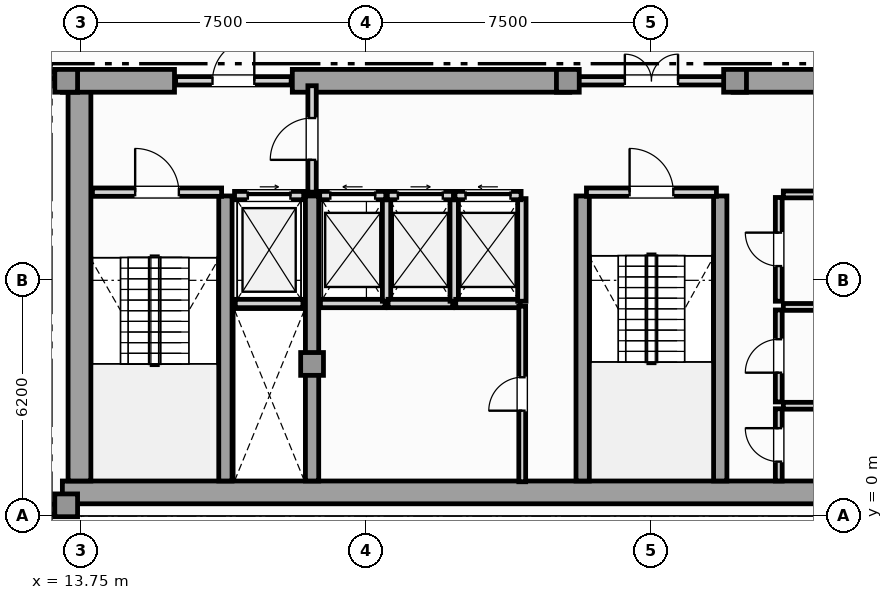
"""IFC4 building model, lengths in metres.
Left out: names, types, materials, properties, quantities, classifications, styles, units other than length and angle.
Written with IfcOpenShell. Run it as: python <this file> out.ifc"""

import sys

from ifc_helpers import new_model, si_unit, direction, frame, frame_2d, origin, origin_2d, place, context, subcontext, project, spatial, rectangle, extrude, element, fill, save


model = new_model("IFC4")
c1 = context("Model", 3, precision=1e-05, world=origin(), true_north=direction((0.0, 1.0)))
c2 = subcontext(c1, "Body", "Model", "MODEL_VIEW")
j1 = project(units=[si_unit("LENGTHUNIT", "METRE"), si_unit("PLANEANGLEUNIT", "RADIAN")], contexts=[c1])
p1 = place(None, origin())
s1 = spatial("IfcSite", under=j1, at=p1, CompositionType="ELEMENT")
p2 = place(p1, origin())
s2 = spatial("IfcBuilding", under=s1, at=p2, CompositionType="ELEMENT")
p3 = place(p2, frame((0.0, 0.0, 281.05)))
s3 = spatial("IfcBuildingStorey", under=s2, at=p3, CompositionType="ELEMENT", Elevation=281.05)
p4 = place(p3, frame((13.25, 0.62, 0.0), z_axis=(0.0, 0.0, 1.0), x_axis=(1.0, 0.0, 0.0)))
e1 = element("IfcWall", 1, at=p4, inside=s3, PredefinedType="SHEAR", context=c2, shape_type="SweptSolid", body=[
    extrude(rectangle(XDim=31.0, YDim=0.6, at=frame_2d((15.5, 0.0))), origin(), (0.0, 0.0, 1.0), 3.65),
])
p5 = place(p3, frame((13.7, 0.92, 0.0), z_axis=(0.0, 0.0, 1.0), x_axis=(0.0, 1.0, 0.0)))
e2 = element("IfcWall", 2, at=p5, inside=s3, PredefinedType="SHEAR", context=c2, shape_type="SweptSolid", body=[
    extrude(rectangle(XDim=10.53, YDim=0.6, at=frame_2d((5.265, 0.0))), origin(), (0.0, 0.0, 1.0), 3.65),
])
p6 = place(p3, frame((13.25, 11.45, 0.0), z_axis=(0.0, 0.0, 1.0), x_axis=(1.0, 0.0, 0.0)))
e3 = element("IfcWall", 3, at=p6, inside=s3, PredefinedType="SHEAR", context=c2, shape_type="SweptSolid", body=[
    extrude(rectangle(XDim=2.95, YDim=0.6, at=frame_2d((1.475, 0.0))), origin(), (0.0, 0.0, 1.0), 3.65),
])
for number, where, z_axis, x_axis in (
    (4, (19.3, 11.45, 0.0), (0.0, 0.0, 1.0), (1.0, 0.0, 0.0)),
    (5, (30.9, 11.45, 0.0), (0.0, 0.0, 1.0), (1.0, 0.0, 0.0)),
):
    element("IfcWall", number, at=place(p3, frame(where, z_axis=z_axis, x_axis=x_axis)), inside=s3, PredefinedType="SHEAR", context=c2, shape_type="SweptSolid", body=[
        extrude(rectangle(XDim=7.3, YDim=0.6, at=frame_2d((3.65, 0.0))), origin(), (0.0, 0.0, 1.0), 3.65),
    ])
for number, where, z_axis, x_axis in (
    (6, (17.54, 0.92, 0.0), (0.0, 0.0, 1.0), (0.0, 1.0, 0.0)),
    (7, (19.82, 0.92, 0.0), (0.0, 0.0, 1.0), (0.0, 1.0, 0.0)),
    (8, (26.94, 0.92, 0.0), (0.0, 0.0, 1.0), (0.0, 1.0, 0.0)),
    (9, (30.56, 0.92, 0.0), (0.0, 0.0, 1.0), (0.0, 1.0, 0.0)),
):
    element("IfcWall", number, at=place(p3, frame(where, z_axis=z_axis, x_axis=x_axis)), inside=s3, PredefinedType="SHEAR", context=c2, shape_type="SweptSolid", body=[
        extrude(rectangle(XDim=7.5, YDim=0.35, at=frame_2d((3.75, 0.0))), origin(), (0.0, 0.0, 1.0), 3.65),
    ])
for number, where, z_axis, x_axis in (
    (10, (13.35, 0.28, 0.0), (0.0, 0.0, 1.0), (1.0, 0.0, 0.0)),
    (11, (13.35, 11.45, 0.0), (0.0, 0.0, 1.0), (1.0, 0.0, 0.0)),
    (12, (19.82, 4.0, 0.0), (0.0, 0.0, 1.0), (1.0, 0.0, 0.0)),
    (13, (26.55, 11.45, 0.0), (0.0, 0.0, 1.0), (1.0, 0.0, 0.0)),
    (14, (30.95, 11.45, 0.0), (0.0, 0.0, 1.0), (1.0, 0.0, 0.0)),
):
    element("IfcColumn", number, at=place(p3, frame(where, z_axis=z_axis, x_axis=x_axis)), inside=s3, PredefinedType="COLUMN", context=c2, shape_type="SweptSolid", body=[
        extrude(rectangle(XDim=0.6, YDim=0.6, at=origin_2d()), origin(), (0.0, 0.0, 1.0), 3.85),
    ])
p7 = place(p3, frame((11.593, 0.18, 0.0), z_axis=(0.0, 0.0, 1.0), x_axis=(1.0, 0.0, 0.0)))
e15 = element("IfcWall", 15, at=p7, inside=s3, PredefinedType="SOLIDWALL", context=c2, shape_type="SweptSolid", body=[
    extrude(rectangle(XDim=1.657, YDim=0.26, at=frame_2d((0.829, 0.0))), origin(), (0.0, 0.0, 1.0), 3.65),
])
p8 = place(p3, frame((17.8, 5.59, 0.0), z_axis=(0.0, 0.0, 1.0), x_axis=(1.0, 0.0, 0.0)))
e16 = element("IfcWall", 16, at=p8, inside=s3, PredefinedType="SOLIDWALL", context=c2, shape_type="SweptSolid", body=[
    extrude(rectangle(XDim=1.78, YDim=0.22, at=frame_2d((0.89, 0.0))), origin(), (0.0, 0.0, 1.0), 3.65),
])
p9 = place(p3, frame((17.78, 8.43, 0.0), z_axis=(0.0, 0.0, 1.0), x_axis=(1.0, 0.0, 0.0)))
e17 = element("IfcWall", 17, at=p9, inside=s3, PredefinedType="SOLIDWALL", context=c2, shape_type="SweptSolid", body=[
    extrude(rectangle(XDim=1.82, YDim=0.22, at=frame_2d((0.91, 0.0))), origin(), (0.0, 0.0, 1.0), 3.65),
])
p10 = place(p9, frame((0.35, 0.0, 0.0)))
e18 = element("IfcOpeningElement", 18, at=p10, cuts=e17, PredefinedType="OPENING", context=c2, shape_type="SweptSolid", body=[
    extrude(rectangle(XDim=1.12, YDim=2.25, at=frame_2d((0.56, 1.125))), frame((0.0, 0.12, 0.0), z_axis=(0.0, -1.0, 0.0), x_axis=(1.0, 0.0, 0.0)), (0.0, 0.0, 1.0), 0.24),
])
p11 = place(p3, frame((20.04, 5.59, 0.0), z_axis=(0.0, 0.0, 1.0), x_axis=(1.0, 0.0, 0.0)))
e19 = element("IfcWall", 19, at=p11, inside=s3, PredefinedType="SOLIDWALL", context=c2, shape_type="SweptSolid", body=[
    extrude(rectangle(XDim=1.7, YDim=0.22, at=frame_2d((0.85, 0.0))), origin(), (0.0, 0.0, 1.0), 3.65),
])
p12 = place(p3, frame((21.78, 5.65, 0.0), z_axis=(0.0, 0.0, 1.0), x_axis=(0.0, 1.0, 0.0)))
e20 = element("IfcWall", 20, at=p12, inside=s3, PredefinedType="SOLIDWALL", context=c2, shape_type="SweptSolid", body=[
    extrude(rectangle(XDim=2.7, YDim=0.22, at=frame_2d((1.35, 0.0))), origin(), (0.0, 0.0, 1.0), 3.65),
])
p13 = place(p3, frame((20.02, 8.43, 0.0), z_axis=(0.0, 0.0, 1.0), x_axis=(1.0, 0.0, 0.0)))
e21 = element("IfcWall", 21, at=p13, inside=s3, PredefinedType="SOLIDWALL", context=c2, shape_type="SweptSolid", body=[
    extrude(rectangle(XDim=1.74, YDim=0.22, at=frame_2d((0.87, 0.0))), origin(), (0.0, 0.0, 1.0), 3.65),
])
p14 = place(p13, frame((0.28, 0.0, 0.0)))
e22 = element("IfcOpeningElement", 22, at=p14, cuts=e21, PredefinedType="OPENING", context=c2, shape_type="SweptSolid", body=[
    extrude(rectangle(XDim=1.18, YDim=2.2, at=frame_2d((0.59, 1.1))), frame((0.0, 0.12, 0.0), z_axis=(0.0, -1.0, 0.0), x_axis=(1.0, 0.0, 0.0)), (0.0, 0.0, 1.0), 0.24),
])
p15 = place(p3, frame((21.82, 5.59, 0.0), z_axis=(0.0, 0.0, 1.0), x_axis=(1.0, 0.0, 0.0)))
e23 = element("IfcWall", 23, at=p15, inside=s3, PredefinedType="SOLIDWALL", context=c2, shape_type="SweptSolid", body=[
    extrude(rectangle(XDim=1.7, YDim=0.22, at=frame_2d((0.85, 0.0))), origin(), (0.0, 0.0, 1.0), 3.65),
])
p16 = place(p3, frame((23.56, 5.65, 0.0), z_axis=(0.0, 0.0, 1.0), x_axis=(0.0, 1.0, 0.0)))
e24 = element("IfcWall", 24, at=p16, inside=s3, PredefinedType="SOLIDWALL", context=c2, shape_type="SweptSolid", body=[
    extrude(rectangle(XDim=2.7, YDim=0.22, at=frame_2d((1.35, 0.0))), origin(), (0.0, 0.0, 1.0), 3.65),
])
p17 = place(p3, frame((21.8, 8.43, 0.0), z_axis=(0.0, 0.0, 1.0), x_axis=(1.0, 0.0, 0.0)))
e25 = element("IfcWall", 25, at=p17, inside=s3, PredefinedType="SOLIDWALL", context=c2, shape_type="SweptSolid", body=[
    extrude(rectangle(XDim=1.74, YDim=0.22, at=frame_2d((0.87, 0.0))), origin(), (0.0, 0.0, 1.0), 3.65),
])
p18 = place(p17, frame((0.28, 0.0, 0.0)))
e26 = element("IfcOpeningElement", 26, at=p18, cuts=e25, PredefinedType="OPENING", context=c2, shape_type="SweptSolid", body=[
    extrude(rectangle(XDim=1.18, YDim=2.2, at=frame_2d((0.59, 1.1))), frame((0.0, 0.12, 0.0), z_axis=(0.0, -1.0, 0.0), x_axis=(1.0, 0.0, 0.0)), (0.0, 0.0, 1.0), 0.24),
])
p19 = place(p3, frame((23.6, 5.59, 0.0), z_axis=(0.0, 0.0, 1.0), x_axis=(1.0, 0.0, 0.0)))
e27 = element("IfcWall", 27, at=p19, inside=s3, PredefinedType="SOLIDWALL", context=c2, shape_type="SweptSolid", body=[
    extrude(rectangle(XDim=1.7, YDim=0.22, at=frame_2d((0.85, 0.0))), origin(), (0.0, 0.0, 1.0), 3.65),
])
p20 = place(p3, frame((25.34, 5.65, 0.0), z_axis=(0.0, 0.0, 1.0), x_axis=(0.0, 1.0, 0.0)))
e28 = element("IfcWall", 28, at=p20, inside=s3, PredefinedType="SOLIDWALL", context=c2, shape_type="SweptSolid", body=[
    extrude(rectangle(XDim=2.7, YDim=0.22, at=frame_2d((1.35, 0.0))), origin(), (0.0, 0.0, 1.0), 3.65),
])
p21 = place(p3, frame((23.58, 8.43, 0.0), z_axis=(0.0, 0.0, 1.0), x_axis=(1.0, 0.0, 0.0)))
e29 = element("IfcWall", 29, at=p21, inside=s3, PredefinedType="SOLIDWALL", context=c2, shape_type="SweptSolid", body=[
    extrude(rectangle(XDim=1.74, YDim=0.22, at=frame_2d((0.87, 0.0))), origin(), (0.0, 0.0, 1.0), 3.65),
])
p22 = place(p21, frame((0.28, 0.0, 0.0)))
e30 = element("IfcOpeningElement", 30, at=p22, cuts=e29, PredefinedType="OPENING", context=c2, shape_type="SweptSolid", body=[
    extrude(rectangle(XDim=1.18, YDim=2.2, at=frame_2d((0.59, 1.1))), frame((0.0, 0.12, 0.0), z_axis=(0.0, -1.0, 0.0), x_axis=(1.0, 0.0, 0.0)), (0.0, 0.0, 1.0), 0.24),
])
p23 = place(p3, frame((14.04, 8.52, 0.0), z_axis=(0.0, 0.0, 1.0), x_axis=(1.0, 0.0, 0.0)))
e31 = element("IfcWall", 31, at=p23, inside=s3, PredefinedType="SOLIDWALL", context=c2, shape_type="SweptSolid", body=[
    extrude(rectangle(XDim=3.4, YDim=0.22, at=frame_2d((1.7, 0.0))), origin(), (0.0, 0.0, 1.0), 3.65),
])
p24 = place(p23, frame((1.125, 0.0, 0.0)))
e32 = element("IfcOpeningElement", 32, at=p24, cuts=e31, PredefinedType="OPENING", context=c2, shape_type="SweptSolid", body=[
    extrude(rectangle(XDim=1.15, YDim=2.2, at=frame_2d((0.575, 1.1))), frame((0.0, 0.12, 0.0), z_axis=(0.0, -1.0, 0.0), x_axis=(1.0, 0.0, 0.0)), (0.0, 0.0, 1.0), 0.24),
])
p25 = place(p3, frame((27.04, 8.52, 0.0), z_axis=(0.0, 0.0, 1.0), x_axis=(1.0, 0.0, 0.0)))
e33 = element("IfcWall", 33, at=p25, inside=s3, PredefinedType="SOLIDWALL", context=c2, shape_type="SweptSolid", body=[
    extrude(rectangle(XDim=3.42, YDim=0.22, at=frame_2d((1.71, 0.0))), origin(), (0.0, 0.0, 1.0), 3.65),
])
p26 = place(p25, frame((1.135, 0.0, 0.0)))
e34 = element("IfcOpeningElement", 34, at=p26, cuts=e33, PredefinedType="OPENING", context=c2, shape_type="SweptSolid", body=[
    extrude(rectangle(XDim=1.15, YDim=2.2, at=frame_2d((0.575, 1.1))), frame((0.0, 0.12, 0.0), z_axis=(0.0, -1.0, 0.0), x_axis=(1.0, 0.0, 0.0)), (0.0, 0.0, 1.0), 0.24),
])
p27 = place(p3, frame((19.82, 8.52, 0.0), z_axis=(0.0, 0.0, 1.0), x_axis=(0.0, 1.0, 0.0)))
e35 = element("IfcWall", 35, at=p27, inside=s3, PredefinedType="SOLIDWALL", context=c2, shape_type="SweptSolid", body=[
    extrude(rectangle(XDim=2.8, YDim=0.22, at=frame_2d((1.4, 0.0))), origin(), (0.0, 0.0, 1.0), 3.105),
])
p28 = place(p27, frame((0.85, 0.0, 0.0)))
e36 = element("IfcOpeningElement", 36, at=p28, cuts=e35, PredefinedType="OPENING", context=c2, shape_type="SweptSolid", body=[
    extrude(rectangle(XDim=1.1, YDim=2.2, at=frame_2d((0.55, 1.1))), frame((0.0, 0.12, 0.0), z_axis=(0.0, -1.0, 0.0), x_axis=(1.0, 0.0, 0.0)), (0.0, 0.0, 1.0), 0.24),
])
p29 = place(p3, frame((16.23, 11.45, 0.0), z_axis=(0.0, 0.0, 1.0), x_axis=(1.0, 0.0, 0.0)))
e37 = element("IfcWall", 37, at=p29, inside=s3, PredefinedType="SOLIDWALL", context=c2, shape_type="SweptSolid", body=[
    extrude(rectangle(XDim=3.04, YDim=0.22, at=frame_2d((1.52, 0.0))), origin(), (0.0, 0.0, 1.0), 3.65),
])
p30 = place(p29, frame((0.97, 0.0, 0.0)))
e38 = element("IfcOpeningElement", 38, at=p30, cuts=e37, PredefinedType="OPENING", context=c2, shape_type="SweptSolid", body=[
    extrude(rectangle(XDim=1.1, YDim=2.2, at=frame_2d((0.55, 1.1))), frame((0.0, 0.12, 0.0), z_axis=(0.0, -1.0, 0.0), x_axis=(1.0, 0.0, 0.0)), (0.0, 0.0, 1.0), 0.24),
])
p31 = place(p3, frame((26.63, 11.45, 0.0), z_axis=(0.0, 0.0, 1.0), x_axis=(1.0, 0.0, 0.0)))
e39 = element("IfcWall", 39, at=p31, inside=s3, PredefinedType="SOLIDWALL", context=c2, shape_type="SweptSolid", body=[
    extrude(rectangle(XDim=4.24, YDim=0.22, at=frame_2d((2.12, 0.0))), origin(), (0.0, 0.0, 1.0), 3.65),
])
p32 = place(p31, frame((1.42, 0.0, 0.0)))
e40 = element("IfcOpeningElement", 40, at=p32, cuts=e39, PredefinedType="OPENING", context=c2, shape_type="SweptSolid", body=[
    extrude(rectangle(XDim=1.4, YDim=2.2, at=frame_2d((0.7, 1.1))), frame((0.0, 0.12, 0.0), z_axis=(0.0, -1.0, 0.0), x_axis=(1.0, 0.0, 0.0)), (0.0, 0.0, 1.0), 0.24),
])
p33 = place(p3, frame((25.35, 0.9, 0.0), z_axis=(0.0, 0.0, 1.0), x_axis=(0.0, 1.0, 0.0)))
e41 = element("IfcWall", 41, at=p33, inside=s3, PredefinedType="PARTITIONING", context=c2, shape_type="SweptSolid", body=[
    extrude(rectangle(XDim=4.62, YDim=0.18, at=frame_2d((2.31, 0.0))), origin(), (0.0, 0.0, 1.0), 3.65),
])
p34 = place(p33, frame((1.87, 0.0, 0.0)))
e42 = element("IfcOpeningElement", 42, at=p34, cuts=e41, PredefinedType="OPENING", context=c2, shape_type="SweptSolid", body=[
    extrude(rectangle(XDim=0.88, YDim=2.05, at=frame_2d((0.44, 1.025))), frame((0.0, 0.1, 0.0), z_axis=(0.0, -1.0, 0.0), x_axis=(1.0, 0.0, 0.0)), (0.0, 0.0, 1.0), 0.2),
])
p35 = place(p3, frame((32.1, 0.92, 0.0), z_axis=(0.0, 0.0, 1.0), x_axis=(0.0, 1.0, 0.0)))
e43 = element("IfcWall", 43, at=p35, inside=s3, PredefinedType="PARTITIONING", context=c2, shape_type="SweptSolid", body=[
    extrude(rectangle(XDim=1.9, YDim=0.18, at=frame_2d((0.95, 0.0))), origin(), (0.0, 0.0, 1.0), 3.65),
])
p36 = place(p35, frame((0.51, 0.0, 0.0)))
e44 = element("IfcOpeningElement", 44, at=p36, cuts=e43, PredefinedType="OPENING", context=c2, shape_type="SweptSolid", body=[
    extrude(rectangle(XDim=0.88, YDim=2.05, at=frame_2d((0.44, 1.025))), frame((0.0, 0.1, 0.0), z_axis=(0.0, -1.0, 0.0), x_axis=(1.0, 0.0, 0.0)), (0.0, 0.0, 1.0), 0.2),
])
p37 = place(p3, frame((32.22, 2.9, 0.0), z_axis=(0.0, 0.0, 1.0), x_axis=(1.0, 0.0, 0.0)))
e45 = element("IfcWall", 45, at=p37, inside=s3, PredefinedType="PARTITIONING", context=c2, shape_type="SweptSolid", body=[
    extrude(rectangle(XDim=2.86, YDim=0.18, at=frame_2d((1.43, 0.0))), origin(), (0.0, 0.0, 1.0), 3.65),
])
p38 = place(p3, frame((32.1, 3.0, 0.0), z_axis=(0.0, 0.0, 1.0), x_axis=(0.0, 1.0, 0.0)))
e46 = element("IfcWall", 46, at=p38, inside=s3, PredefinedType="PARTITIONING", context=c2, shape_type="SweptSolid", body=[
    extrude(rectangle(XDim=2.42, YDim=0.18, at=frame_2d((1.21, 0.0))), origin(), (0.0, 0.0, 1.0), 3.65),
])
p39 = place(p38, frame((0.77, 0.0, 0.0)))
e47 = element("IfcOpeningElement", 47, at=p39, cuts=e46, PredefinedType="OPENING", context=c2, shape_type="SweptSolid", body=[
    extrude(rectangle(XDim=0.88, YDim=2.05, at=frame_2d((0.44, 1.025))), frame((0.0, 0.1, 0.0), z_axis=(0.0, -1.0, 0.0), x_axis=(1.0, 0.0, 0.0)), (0.0, 0.0, 1.0), 0.2),
])
p40 = place(p3, frame((32.22, 5.5, 0.0), z_axis=(0.0, 0.0, 1.0), x_axis=(1.0, 0.0, 0.0)))
e48 = element("IfcWall", 48, at=p40, inside=s3, PredefinedType="PARTITIONING", context=c2, shape_type="SweptSolid", body=[
    extrude(rectangle(XDim=2.9, YDim=0.18, at=frame_2d((1.45, 0.0))), origin(), (0.0, 0.0, 1.0), 3.65),
])
p41 = place(p3, frame((32.1, 5.65, 0.0), z_axis=(0.0, 0.0, 1.0), x_axis=(0.0, 1.0, 0.0)))
e49 = element("IfcWall", 49, at=p41, inside=s3, PredefinedType="PARTITIONING", context=c2, shape_type="SweptSolid", body=[
    extrude(rectangle(XDim=2.73, YDim=0.18, at=frame_2d((1.365, 0.0))), origin(), (0.0, 0.0, 1.0), 3.65),
])
p42 = place(p41, frame((0.925, 0.0, 0.0)))
e50 = element("IfcOpeningElement", 50, at=p42, cuts=e49, PredefinedType="OPENING", context=c2, shape_type="SweptSolid", body=[
    extrude(rectangle(XDim=0.88, YDim=2.05, at=frame_2d((0.44, 1.025))), frame((0.0, 0.1, 0.0), z_axis=(0.0, -1.0, 0.0), x_axis=(1.0, 0.0, 0.0)), (0.0, 0.0, 1.0), 0.2),
])
p43 = place(p3, frame((32.22, 8.46, 0.0), z_axis=(0.0, 0.0, 1.0), x_axis=(1.0, 0.0, 0.0)))
e51 = element("IfcWall", 51, at=p43, inside=s3, PredefinedType="PARTITIONING", context=c2, shape_type="SweptSolid", body=[
    extrude(rectangle(XDim=2.88, YDim=0.18, at=frame_2d((1.44, 0.0))), origin(), (0.0, 0.0, 1.0), 3.65),
])
p44 = place(p3, frame((8.503, 11.6, 0.0), z_axis=(0.0, 0.0, 1.0), x_axis=(1.0, 0.0, 0.0)))
e52 = element("IfcWall", 52, at=p44, inside=s3, PredefinedType="PARTITIONING", context=c2, shape_type="SweptSolid", body=[
    extrude(rectangle(XDim=4.642, YDim=0.18, at=frame_2d((2.321, 0.0))), origin(), (0.0, 0.0, 1.0), 3.65),
])
p45 = place(p44, frame((1.821, 0.0, 0.0)))
e53 = element("IfcOpeningElement", 53, at=p45, cuts=e52, PredefinedType="OPENING", context=c2, shape_type="SweptSolid", body=[
    extrude(rectangle(XDim=1.0, YDim=2.15, at=frame_2d((0.5, 1.075))), frame((0.0, 0.1, 0.0), z_axis=(0.0, -1.0, 0.0), x_axis=(1.0, 0.0, 0.0)), (0.0, 0.0, 1.0), 0.2),
])
p46 = place(p10, origin())
e54 = element("IfcDoor", 54, at=p46, inside=s3, OperationType="SLIDING_TO_RIGHT", PredefinedType="DOOR", context=c2, shape_type="SweptSolid", body=[
    extrude(rectangle(XDim=1.12, YDim=2.25, at=frame_2d((0.56, 1.125))), frame((0.0, 0.025, 0.0), z_axis=(0.0, -1.0, 0.0), x_axis=(1.0, 0.0, 0.0)), (0.0, 0.0, 1.0), 0.05),
])
fill(e18, e54)
p47 = place(p14, origin())
e55 = element("IfcDoor", 55, at=p47, inside=s3, OperationType="SLIDING_TO_LEFT", PredefinedType="DOOR", context=c2, shape_type="SweptSolid", body=[
    extrude(rectangle(XDim=1.18, YDim=2.2, at=frame_2d((0.59, 1.1))), frame((0.0, 0.025, 0.0), z_axis=(0.0, -1.0, 0.0), x_axis=(1.0, 0.0, 0.0)), (0.0, 0.0, 1.0), 0.05),
])
fill(e22, e55)
p48 = place(p18, origin())
e56 = element("IfcDoor", 56, at=p48, inside=s3, OperationType="SLIDING_TO_RIGHT", PredefinedType="DOOR", context=c2, shape_type="SweptSolid", body=[
    extrude(rectangle(XDim=1.18, YDim=2.2, at=frame_2d((0.59, 1.1))), frame((0.0, 0.025, 0.0), z_axis=(0.0, -1.0, 0.0), x_axis=(1.0, 0.0, 0.0)), (0.0, 0.0, 1.0), 0.05),
])
fill(e26, e56)
p49 = place(p22, origin())
e57 = element("IfcDoor", 57, at=p49, inside=s3, OperationType="SLIDING_TO_LEFT", PredefinedType="DOOR", context=c2, shape_type="SweptSolid", body=[
    extrude(rectangle(XDim=1.18, YDim=2.2, at=frame_2d((0.59, 1.1))), frame((0.0, 0.025, 0.0), z_axis=(0.0, -1.0, 0.0), x_axis=(1.0, 0.0, 0.0)), (0.0, 0.0, 1.0), 0.05),
])
fill(e30, e57)
p50 = place(p24, origin())
e58 = element("IfcDoor", 58, at=p50, inside=s3, OperationType="SINGLE_SWING_LEFT", PredefinedType="DOOR", context=c2, shape_type="SweptSolid", body=[
    extrude(rectangle(XDim=1.15, YDim=2.2, at=frame_2d((0.575, 1.1))), frame((0.0, 0.025, 0.0), z_axis=(0.0, -1.0, 0.0), x_axis=(1.0, 0.0, 0.0)), (0.0, 0.0, 1.0), 0.05),
])
fill(e32, e58)
p51 = place(p26, origin())
e59 = element("IfcDoor", 59, at=p51, inside=s3, OperationType="SINGLE_SWING_LEFT", PredefinedType="DOOR", context=c2, shape_type="SweptSolid", body=[
    extrude(rectangle(XDim=1.15, YDim=2.2, at=frame_2d((0.575, 1.1))), frame((0.0, 0.025, 0.0), z_axis=(0.0, -1.0, 0.0), x_axis=(1.0, 0.0, 0.0)), (0.0, 0.0, 1.0), 0.05),
])
fill(e34, e59)
p52 = place(p28, origin())
e60 = element("IfcDoor", 60, at=p52, inside=s3, OperationType="SINGLE_SWING_LEFT", PredefinedType="DOOR", context=c2, shape_type="SweptSolid", body=[
    extrude(rectangle(XDim=1.1, YDim=2.2, at=frame_2d((0.55, 1.1))), frame((0.0, 0.025, 0.0), z_axis=(0.0, -1.0, 0.0), x_axis=(1.0, 0.0, 0.0)), (0.0, 0.0, 1.0), 0.05),
])
fill(e36, e60)
p53 = place(p30, origin())
e61 = element("IfcDoor", 61, at=p53, inside=s3, OperationType="SINGLE_SWING_RIGHT", PredefinedType="DOOR", context=c2, shape_type="SweptSolid", body=[
    extrude(rectangle(XDim=1.1, YDim=2.2, at=frame_2d((0.55, 1.1))), frame((0.0, 0.025, 0.0), z_axis=(0.0, -1.0, 0.0), x_axis=(1.0, 0.0, 0.0)), (0.0, 0.0, 1.0), 0.05),
])
fill(e38, e61)
p54 = place(p32, origin())
e62 = element("IfcDoor", 62, at=p54, inside=s3, OperationType="DOUBLE_DOOR_SINGLE_SWING", PredefinedType="DOOR", context=c2, shape_type="SweptSolid", body=[
    extrude(rectangle(XDim=1.4, YDim=2.2, at=frame_2d((0.7, 1.1))), frame((0.0, 0.025, 0.0), z_axis=(0.0, -1.0, 0.0), x_axis=(1.0, 0.0, 0.0)), (0.0, 0.0, 1.0), 0.05),
])
fill(e40, e62)
p55 = place(p34, origin())
e63 = element("IfcDoor", 63, at=p55, inside=s3, OperationType="SINGLE_SWING_LEFT", PredefinedType="DOOR", context=c2, shape_type="SweptSolid", body=[
    extrude(rectangle(XDim=0.88, YDim=2.05, at=frame_2d((0.44, 1.025))), frame((0.0, 0.025, 0.0), z_axis=(0.0, -1.0, 0.0), x_axis=(1.0, 0.0, 0.0)), (0.0, 0.0, 1.0), 0.05),
])
fill(e42, e63)
p56 = place(p36, origin())
e64 = element("IfcDoor", 64, at=p56, inside=s3, OperationType="SINGLE_SWING_RIGHT", PredefinedType="DOOR", context=c2, shape_type="SweptSolid", body=[
    extrude(rectangle(XDim=0.88, YDim=2.05, at=frame_2d((0.44, 1.025))), frame((0.0, 0.025, 0.0), z_axis=(0.0, -1.0, 0.0), x_axis=(1.0, 0.0, 0.0)), (0.0, 0.0, 1.0), 0.05),
])
fill(e44, e64)
p57 = place(p39, origin())
e65 = element("IfcDoor", 65, at=p57, inside=s3, OperationType="SINGLE_SWING_LEFT", PredefinedType="DOOR", context=c2, shape_type="SweptSolid", body=[
    extrude(rectangle(XDim=0.88, YDim=2.05, at=frame_2d((0.44, 1.025))), frame((0.0, 0.025, 0.0), z_axis=(0.0, -1.0, 0.0), x_axis=(1.0, 0.0, 0.0)), (0.0, 0.0, 1.0), 0.05),
])
fill(e47, e65)
p58 = place(p42, origin())
e66 = element("IfcDoor", 66, at=p58, inside=s3, OperationType="SINGLE_SWING_RIGHT", PredefinedType="DOOR", context=c2, shape_type="SweptSolid", body=[
    extrude(rectangle(XDim=0.88, YDim=2.05, at=frame_2d((0.44, 1.025))), frame((0.0, 0.025, 0.0), z_axis=(0.0, -1.0, 0.0), x_axis=(1.0, 0.0, 0.0)), (0.0, 0.0, 1.0), 0.05),
])
fill(e50, e66)
save(model, sys.argv[1])
